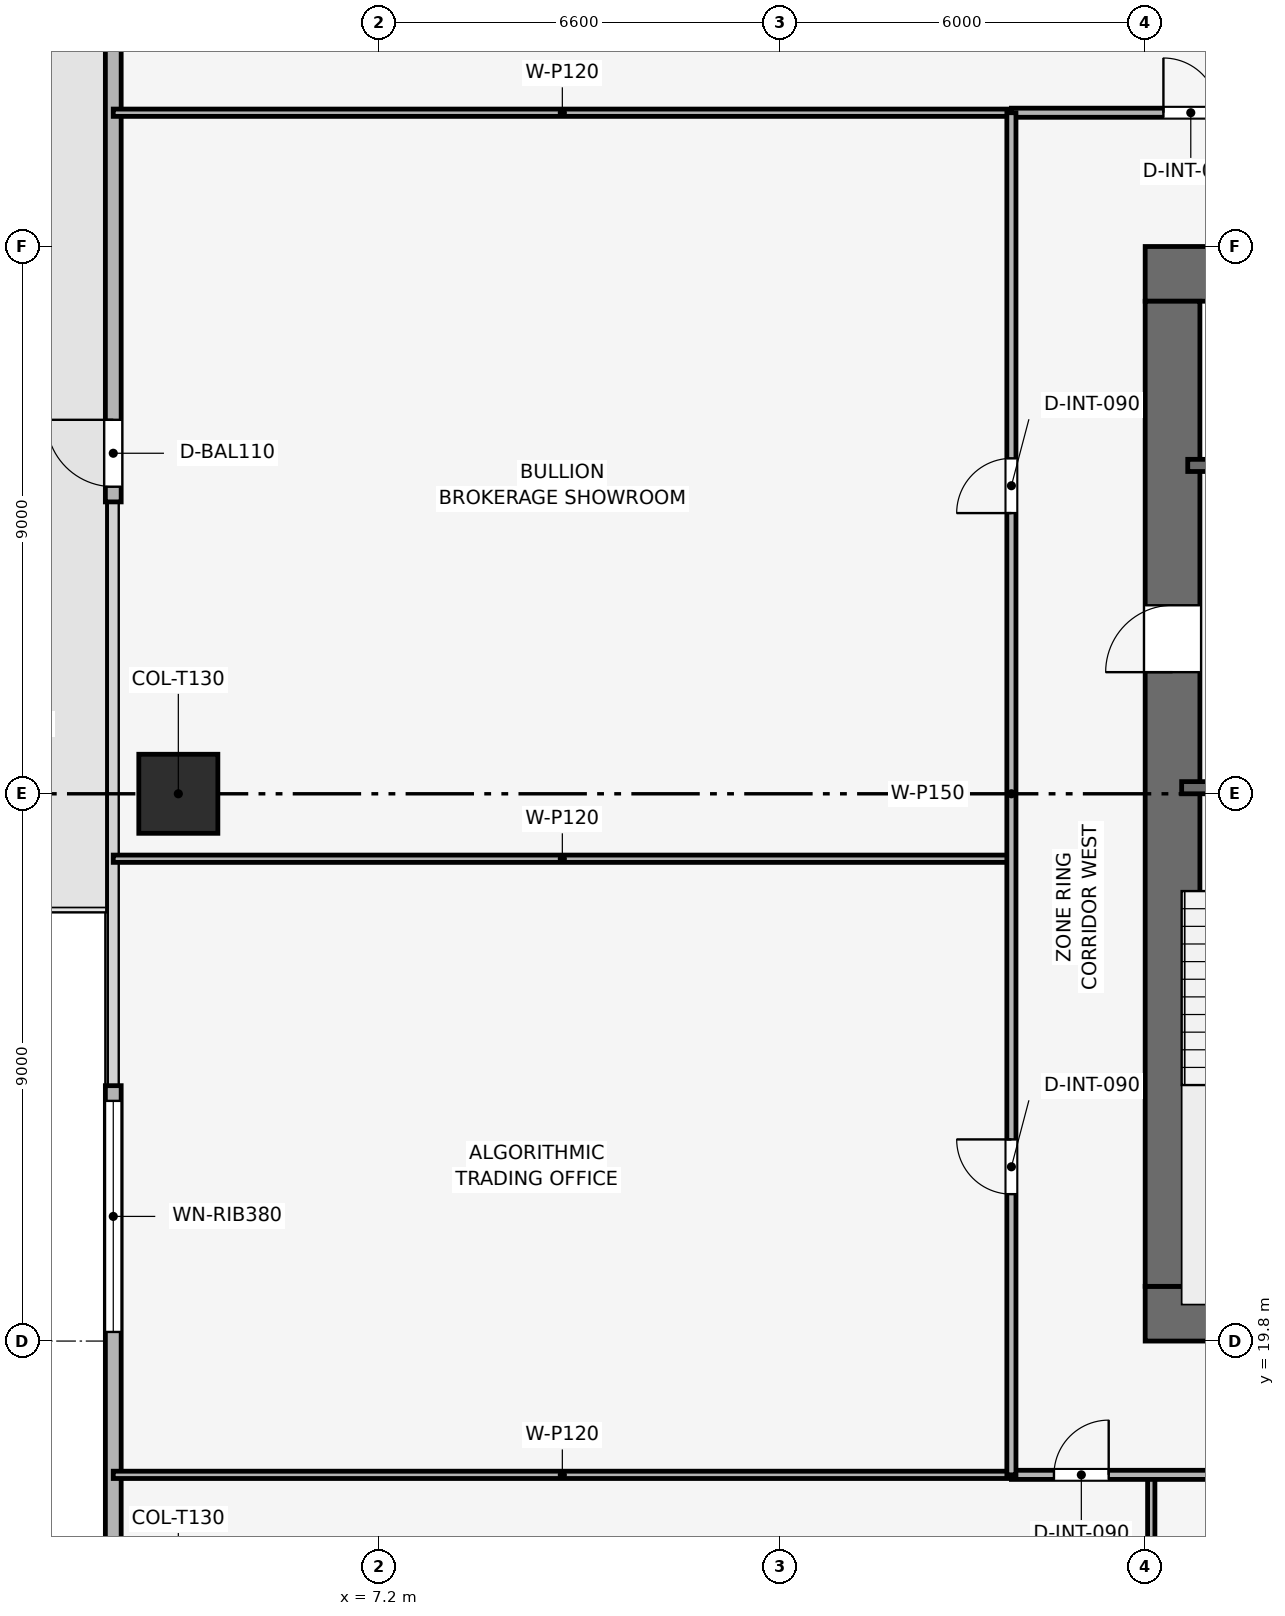
"""IFC4 building model, lengths in metres.
Left out: names, types, materials, properties, quantities, classifications, styles, units other than length and angle.
Written with IfcOpenShell. Run it as: python <this file> out.ifc"""

import sys

from ifc_helpers import new_model, si_unit, direction, frame, frame_2d, origin, origin_2d, place, context, subcontext, project, spatial, rectangle, extrude, element, fill, save


model = new_model("IFC4")
c1 = context("Model", 3, precision=1e-05, world=origin(), true_north=direction((0.0, 1.0)))
c2 = subcontext(c1, "Body", "Model", "MODEL_VIEW")
j1 = project(units=[si_unit("LENGTHUNIT", "METRE"), si_unit("PLANEANGLEUNIT", "RADIAN")], contexts=[c1])
p1 = place(None, origin())
s1 = spatial("IfcSite", under=j1, at=p1, CompositionType="ELEMENT")
p2 = place(p1, origin())
s2 = spatial("IfcBuilding", under=s1, at=p2, CompositionType="ELEMENT")
p3 = place(p2, frame((0.0, 0.0, 125.1)))
s3 = spatial("IfcBuildingStorey", under=s2, at=p3, CompositionType="ELEMENT", Elevation=125.1)
p4 = place(p3, frame((19.8, 20.25, 0.0), z_axis=(0.0, 0.0, 1.0), x_axis=(1.0, 0.0, 0.0)))
e1 = element("IfcWall", 1, at=p4, inside=s3, PredefinedType="SHEAR", context=c2, shape_type="SweptSolid", body=[
    extrude(rectangle(XDim=18.0, YDim=0.9, at=frame_2d((9.0, 0.0))), origin(), (0.0, 0.0, 1.0), 3.9),
])
p5 = place(p4, frame((8.4, 0.0, 0.0)))
e2 = element("IfcOpeningElement", 2, at=p5, cuts=e1, PredefinedType="OPENING", context=c2, shape_type="SweptSolid", body=[
    extrude(rectangle(XDim=1.2, YDim=2.2, at=frame_2d((0.6, 1.1))), frame((0.0, 0.46, 0.0), z_axis=(0.0, -1.0, 0.0), x_axis=(1.0, 0.0, 0.0)), (0.0, 0.0, 1.0), 0.92),
])
p6 = place(p3, frame((19.8, 37.35, 0.0), z_axis=(0.0, 0.0, 1.0), x_axis=(1.0, 0.0, 0.0)))
e3 = element("IfcWall", 3, at=p6, inside=s3, PredefinedType="SHEAR", context=c2, shape_type="SweptSolid", body=[
    extrude(rectangle(XDim=18.0, YDim=0.9, at=frame_2d((9.0, 0.0))), origin(), (0.0, 0.0, 1.0), 3.9),
])
p7 = place(p6, frame((7.05, 0.0, 0.0)))
e4 = element("IfcOpeningElement", 4, at=p7, cuts=e3, PredefinedType="OPENING", context=c2, shape_type="SweptSolid", body=[
    extrude(rectangle(XDim=1.1, YDim=2.15, at=frame_2d((0.55, 1.075))), frame((0.0, 0.46, 0.0), z_axis=(0.0, -1.0, 0.0), x_axis=(1.0, 0.0, 0.0)), (0.0, 0.0, 1.0), 0.92),
])
p8 = place(p3, frame((20.25, 20.7, 0.0), z_axis=(0.0, 0.0, 1.0), x_axis=(0.0, 1.0, 0.0)))
e5 = element("IfcWall", 5, at=p8, inside=s3, PredefinedType="SHEAR", context=c2, shape_type="SweptSolid", body=[
    extrude(rectangle(XDim=16.2, YDim=0.9, at=frame_2d((8.1, 0.0))), origin(), (0.0, 0.0, 1.0), 3.9),
])
p9 = place(p8, frame((10.1, 0.0, 0.0)))
e6 = element("IfcOpeningElement", 6, at=p9, cuts=e5, PredefinedType="OPENING", context=c2, shape_type="SweptSolid", body=[
    extrude(rectangle(XDim=1.1, YDim=2.15, at=frame_2d((0.55, 1.075))), frame((0.0, 0.46, 0.0), z_axis=(0.0, -1.0, 0.0), x_axis=(1.0, 0.0, 0.0)), (0.0, 0.0, 1.0), 0.92),
])
p10 = place(p3, frame((3.9, 28.8, 0.003), z_axis=(0.0, 0.0, 1.0), x_axis=(1.0, 0.0, 0.0)))
e7 = element("IfcColumn", 7, at=p10, inside=s3, PredefinedType="COLUMN", context=c2, shape_type="SweptSolid", body=[
    extrude(rectangle(XDim=1.3, YDim=1.3, at=origin_2d()), origin(), (0.0, 0.0, 1.0), 3.644),
])
p11 = place(p3, frame((2.83, 9.9, 0.0), z_axis=(0.0, 0.0, 1.0), x_axis=(0.0, 1.0, 0.0)))
e8 = element("IfcWall", 8, at=p11, inside=s3, PredefinedType="SOLIDWALL", context=c2, shape_type="SweptSolid", body=[
    extrude(rectangle(XDim=14.1, YDim=0.26, at=frame_2d((7.05, 0.0))), origin(), (0.0, 0.0, 1.0), 3.65),
])
p12 = place(p11, frame((10.05, 0.0, 0.9)))
e9 = element("IfcOpeningElement", 9, at=p12, cuts=e8, PredefinedType="OPENING", context=c2, shape_type="SweptSolid", body=[
    extrude(rectangle(XDim=3.8, YDim=1.9, at=frame_2d((1.9, 0.95))), frame((0.0, 0.14, 0.0), z_axis=(0.0, -1.0, 0.0), x_axis=(1.0, 0.0, 0.0)), (0.0, 0.0, 1.0), 0.28),
])
p13 = place(p3, frame((2.83, 33.6, 0.0), z_axis=(0.0, 0.0, 1.0), x_axis=(0.0, 1.0, 0.0)))
e10 = element("IfcWall", 10, at=p13, inside=s3, PredefinedType="SOLIDWALL", context=c2, shape_type="SweptSolid", body=[
    extrude(rectangle(XDim=14.1, YDim=0.26, at=frame_2d((7.05, 0.0))), origin(), (0.0, 0.0, 1.0), 3.65),
])
p14 = place(p13, frame((0.25, 0.0, 0.0)))
e11 = element("IfcOpeningElement", 11, at=p14, cuts=e10, PredefinedType="OPENING", context=c2, shape_type="SweptSolid", body=[
    extrude(rectangle(XDim=1.1, YDim=2.2, at=frame_2d((0.55, 1.1))), frame((0.0, 0.14, 0.0), z_axis=(0.0, -1.0, 0.0), x_axis=(1.0, 0.0, 0.0)), (0.0, 0.0, 1.0), 0.28),
])
p15 = place(p3, frame((20.4, 28.9, 0.0), z_axis=(0.0, 0.0, 1.0), x_axis=(1.0, 0.0, 0.0)))
e12 = element("IfcWall", 12, at=p15, inside=s3, PredefinedType="SHEAR", context=c2, shape_type="SweptSolid", body=[
    extrude(rectangle(XDim=3.15, YDim=0.2, at=frame_2d((1.575, 0.0))), origin(), (0.0, 0.0, 1.0), 3.65),
])
p16 = place(p15, frame((0.8, 0.0, 0.0)))
e13 = element("IfcOpeningElement", 13, at=p16, cuts=e12, PredefinedType="OPENING", context=c2, shape_type="SweptSolid", body=[
    extrude(rectangle(XDim=1.0, YDim=2.1, at=frame_2d((0.5, 1.05))), frame((0.0, 0.11, 0.0), z_axis=(0.0, -1.0, 0.0), x_axis=(1.0, 0.0, 0.0)), (0.0, 0.0, 1.0), 0.22),
])
p17 = place(p3, frame((20.5, 34.2, 0.0), z_axis=(0.0, 0.0, 1.0), x_axis=(1.0, 0.0, 0.0)))
e14 = element("IfcWall", 14, at=p17, inside=s3, PredefinedType="SHEAR", context=c2, shape_type="SweptSolid", body=[
    extrude(rectangle(XDim=3.05, YDim=0.2, at=frame_2d((1.525, 0.0))), origin(), (0.0, 0.0, 1.0), 3.65),
])
p18 = place(p17, frame((0.75, 0.0, 0.0)))
e15 = element("IfcOpeningElement", 15, at=p18, cuts=e14, PredefinedType="OPENING", context=c2, shape_type="SweptSolid", body=[
    extrude(rectangle(XDim=1.1, YDim=2.15, at=frame_2d((0.55, 1.075))), frame((0.0, 0.11, 0.0), z_axis=(0.0, -1.0, 0.0), x_axis=(1.0, 0.0, 0.0)), (0.0, 0.0, 1.0), 0.22),
])
for number, where, z_axis, x_axis in (
    (16, (19.9, 2.83, 0.0), (0.0, 0.0, 1.0), (0.0, 1.0, 0.0)),
    (17, (2.83, 17.6, 0.0), (0.0, 0.0, 1.0), (1.0, 0.0, 0.0)),
    (18, (2.83, 40.0, 0.0), (0.0, 0.0, 1.0), (1.0, 0.0, 0.0)),
    (19, (2.83, 27.732, 0.0), (0.0, 0.0, 1.0), (1.0, 0.0, 0.0)),
):
    element("IfcWall", number, at=place(p3, frame(where, z_axis=z_axis, x_axis=x_axis)), inside=s3, PredefinedType="PARTITIONING", context=c2, shape_type="SweptSolid", body=[
        extrude(rectangle(XDim=14.77, YDim=0.12, at=frame_2d((7.385, 0.0))), origin(), (0.0, 0.0, 1.0), 3.035),
    ])
p19 = place(p3, frame((17.6, 17.6, 0.0), z_axis=(0.0, 0.0, 1.0), x_axis=(1.0, 0.0, 0.0)))
e20 = element("IfcWall", 20, at=p19, inside=s3, PredefinedType="PARTITIONING", context=c2, shape_type="SweptSolid", body=[
    extrude(rectangle(XDim=22.4, YDim=0.15, at=frame_2d((11.2, 0.0))), origin(), (0.0, 0.0, 1.0), 3.185),
])
p20 = place(p19, frame((0.7, 0.0, 0.0)))
e21 = element("IfcOpeningElement", 21, at=p20, cuts=e20, PredefinedType="OPENING", context=c2, shape_type="SweptSolid", body=[
    extrude(rectangle(XDim=0.9, YDim=2.1, at=frame_2d((0.45, 1.05))), frame((0.0, 0.085, 0.0), z_axis=(0.0, -1.0, 0.0), x_axis=(1.0, 0.0, 0.0)), (0.0, 0.0, 1.0), 0.17),
])
p21 = place(p19, frame((4.907, 0.0, 0.0)))
e22 = element("IfcOpeningElement", 22, at=p21, cuts=e20, PredefinedType="OPENING", context=c2, shape_type="SweptSolid", body=[
    extrude(rectangle(XDim=0.9, YDim=2.1, at=frame_2d((0.45, 1.05))), frame((0.0, 0.085, 0.0), z_axis=(0.0, -1.0, 0.0), x_axis=(1.0, 0.0, 0.0)), (0.0, 0.0, 1.0), 0.17),
])
p22 = place(p19, frame((10.848, 0.0, 0.0)))
e23 = element("IfcOpeningElement", 23, at=p22, cuts=e20, PredefinedType="OPENING", context=c2, shape_type="SweptSolid", body=[
    extrude(rectangle(XDim=0.9, YDim=2.1, at=frame_2d((0.45, 1.05))), frame((0.0, 0.085, 0.0), z_axis=(0.0, -1.0, 0.0), x_axis=(1.0, 0.0, 0.0)), (0.0, 0.0, 1.0), 0.17),
])
p23 = place(p19, frame((17.84, 0.0, 0.0)))
e24 = element("IfcOpeningElement", 24, at=p23, cuts=e20, PredefinedType="OPENING", context=c2, shape_type="SweptSolid", body=[
    extrude(rectangle(XDim=0.9, YDim=2.1, at=frame_2d((0.45, 1.05))), frame((0.0, 0.085, 0.0), z_axis=(0.0, -1.0, 0.0), x_axis=(1.0, 0.0, 0.0)), (0.0, 0.0, 1.0), 0.17),
])
p24 = place(p3, frame((17.6, 40.0, 0.0), z_axis=(0.0, 0.0, 1.0), x_axis=(1.0, 0.0, 0.0)))
e25 = element("IfcWall", 25, at=p24, inside=s3, PredefinedType="PARTITIONING", context=c2, shape_type="SweptSolid", body=[
    extrude(rectangle(XDim=22.4, YDim=0.15, at=frame_2d((11.2, 0.0))), origin(), (0.0, 0.0, 1.0), 3.185),
])
p25 = place(p24, frame((2.5, 0.0, 0.0)))
e26 = element("IfcOpeningElement", 26, at=p25, cuts=e25, PredefinedType="OPENING", context=c2, shape_type="SweptSolid", body=[
    extrude(rectangle(XDim=0.9, YDim=2.1, at=frame_2d((0.45, 1.05))), frame((0.0, 0.085, 0.0), z_axis=(0.0, -1.0, 0.0), x_axis=(1.0, 0.0, 0.0)), (0.0, 0.0, 1.0), 0.17),
])
p26 = place(p24, frame((6.85, 0.0, 0.0)))
e27 = element("IfcOpeningElement", 27, at=p26, cuts=e25, PredefinedType="OPENING", context=c2, shape_type="SweptSolid", body=[
    extrude(rectangle(XDim=0.9, YDim=2.1, at=frame_2d((0.45, 1.05))), frame((0.0, 0.085, 0.0), z_axis=(0.0, -1.0, 0.0), x_axis=(1.0, 0.0, 0.0)), (0.0, 0.0, 1.0), 0.17),
])
p27 = place(p24, frame((9.75, 0.0, 0.0)))
e28 = element("IfcOpeningElement", 28, at=p27, cuts=e25, PredefinedType="OPENING", context=c2, shape_type="SweptSolid", body=[
    extrude(rectangle(XDim=0.9, YDim=2.1, at=frame_2d((0.45, 1.05))), frame((0.0, 0.085, 0.0), z_axis=(0.0, -1.0, 0.0), x_axis=(1.0, 0.0, 0.0)), (0.0, 0.0, 1.0), 0.17),
])
p28 = place(p24, frame((12.5, 0.0, 0.0)))
e29 = element("IfcOpeningElement", 29, at=p28, cuts=e25, PredefinedType="OPENING", context=c2, shape_type="SweptSolid", body=[
    extrude(rectangle(XDim=0.95, YDim=2.1, at=frame_2d((0.475, 1.05))), frame((0.0, 0.085, 0.0), z_axis=(0.0, -1.0, 0.0), x_axis=(1.0, 0.0, 0.0)), (0.0, 0.0, 1.0), 0.17),
])
p29 = place(p24, frame((17.9, 0.0, 0.0)))
e30 = element("IfcOpeningElement", 30, at=p29, cuts=e25, PredefinedType="OPENING", context=c2, shape_type="SweptSolid", body=[
    extrude(rectangle(XDim=0.9, YDim=2.1, at=frame_2d((0.45, 1.05))), frame((0.0, 0.085, 0.0), z_axis=(0.0, -1.0, 0.0), x_axis=(1.0, 0.0, 0.0)), (0.0, 0.0, 1.0), 0.17),
])
p30 = place(p3, frame((17.6, 17.6, 0.0), z_axis=(0.0, 0.0, 1.0), x_axis=(0.0, 1.0, 0.0)))
e31 = element("IfcWall", 31, at=p30, inside=s3, PredefinedType="PARTITIONING", context=c2, shape_type="SweptSolid", body=[
    extrude(rectangle(XDim=22.4, YDim=0.15, at=frame_2d((11.2, 0.0))), origin(), (0.0, 0.0, 1.0), 3.185),
])
p31 = place(p30, frame((4.616, 0.0, 0.0)))
e32 = element("IfcOpeningElement", 32, at=p31, cuts=e31, PredefinedType="OPENING", context=c2, shape_type="SweptSolid", body=[
    extrude(rectangle(XDim=0.9, YDim=2.1, at=frame_2d((0.45, 1.05))), frame((0.0, 0.085, 0.0), z_axis=(0.0, -1.0, 0.0), x_axis=(1.0, 0.0, 0.0)), (0.0, 0.0, 1.0), 0.17),
])
p32 = place(p30, frame((15.816, 0.0, 0.0)))
e33 = element("IfcOpeningElement", 33, at=p32, cuts=e31, PredefinedType="OPENING", context=c2, shape_type="SweptSolid", body=[
    extrude(rectangle(XDim=0.9, YDim=2.1, at=frame_2d((0.45, 1.05))), frame((0.0, 0.085, 0.0), z_axis=(0.0, -1.0, 0.0), x_axis=(1.0, 0.0, 0.0)), (0.0, 0.0, 1.0), 0.17),
])
p33 = place(p14, origin())
e34 = element("IfcDoor", 34, at=p33, inside=s3, OperationType="SINGLE_SWING_RIGHT", PredefinedType="DOOR", context=c2, shape_type="SweptSolid", body=[
    extrude(rectangle(XDim=1.1, YDim=2.2, at=frame_2d((0.55, 1.1))), frame((0.0, 0.025, 0.0), z_axis=(0.0, -1.0, 0.0), x_axis=(1.0, 0.0, 0.0)), (0.0, 0.0, 1.0), 0.05),
])
fill(e11, e34)
p34 = place(p12, origin())
e35 = element("IfcWindow", 35, at=p34, inside=s3, PartitioningType="SINGLE_PANEL", PredefinedType="WINDOW", context=c2, shape_type="SweptSolid", body=[
    extrude(rectangle(XDim=3.8, YDim=1.9, at=frame_2d((1.9, 0.95))), frame((0.0, 0.03, 0.0), z_axis=(0.0, -1.0, 0.0), x_axis=(1.0, 0.0, 0.0)), (0.0, 0.0, 1.0), 0.06),
])
fill(e9, e35)
p35 = place(p20, origin())
e36 = element("IfcDoor", 36, at=p35, inside=s3, OperationType="SINGLE_SWING_RIGHT", PredefinedType="DOOR", context=c2, shape_type="SweptSolid", body=[
    extrude(rectangle(XDim=0.9, YDim=2.1, at=frame_2d((0.45, 1.05))), frame((0.0, 0.025, 0.0), z_axis=(0.0, -1.0, 0.0), x_axis=(1.0, 0.0, 0.0)), (0.0, 0.0, 1.0), 0.05),
])
fill(e21, e36)
p36 = place(p25, origin())
e37 = element("IfcDoor", 37, at=p36, inside=s3, OperationType="SINGLE_SWING_LEFT", PredefinedType="DOOR", context=c2, shape_type="SweptSolid", body=[
    extrude(rectangle(XDim=0.9, YDim=2.1, at=frame_2d((0.45, 1.05))), frame((0.0, 0.025, 0.0), z_axis=(0.0, -1.0, 0.0), x_axis=(1.0, 0.0, 0.0)), (0.0, 0.0, 1.0), 0.05),
])
fill(e26, e37)
p37 = place(p31, origin())
e38 = element("IfcDoor", 38, at=p37, inside=s3, OperationType="SINGLE_SWING_RIGHT", PredefinedType="DOOR", context=c2, shape_type="SweptSolid", body=[
    extrude(rectangle(XDim=0.9, YDim=2.1, at=frame_2d((0.45, 1.05))), frame((0.0, 0.025, 0.0), z_axis=(0.0, -1.0, 0.0), x_axis=(1.0, 0.0, 0.0)), (0.0, 0.0, 1.0), 0.05),
])
fill(e32, e38)
p38 = place(p32, origin())
e39 = element("IfcDoor", 39, at=p38, inside=s3, OperationType="SINGLE_SWING_LEFT", PredefinedType="DOOR", context=c2, shape_type="SweptSolid", body=[
    extrude(rectangle(XDim=0.9, YDim=2.1, at=frame_2d((0.45, 1.05))), frame((0.0, 0.025, 0.0), z_axis=(0.0, -1.0, 0.0), x_axis=(1.0, 0.0, 0.0)), (0.0, 0.0, 1.0), 0.05),
])
fill(e33, e39)
p39 = place(p9, origin())
e40 = element("IfcDoor", 40, at=p39, inside=s3, OperationType="SINGLE_SWING_LEFT", PredefinedType="DOOR", context=c2, shape_type="SweptSolid", body=[
    extrude(rectangle(XDim=1.1, YDim=2.15, at=frame_2d((0.55, 1.075))), frame((0.0, 0.025, 0.0), z_axis=(0.0, -1.0, 0.0), x_axis=(1.0, 0.0, 0.0)), (0.0, 0.0, 1.0), 0.05),
])
fill(e6, e40)
save(model, sys.argv[1])
